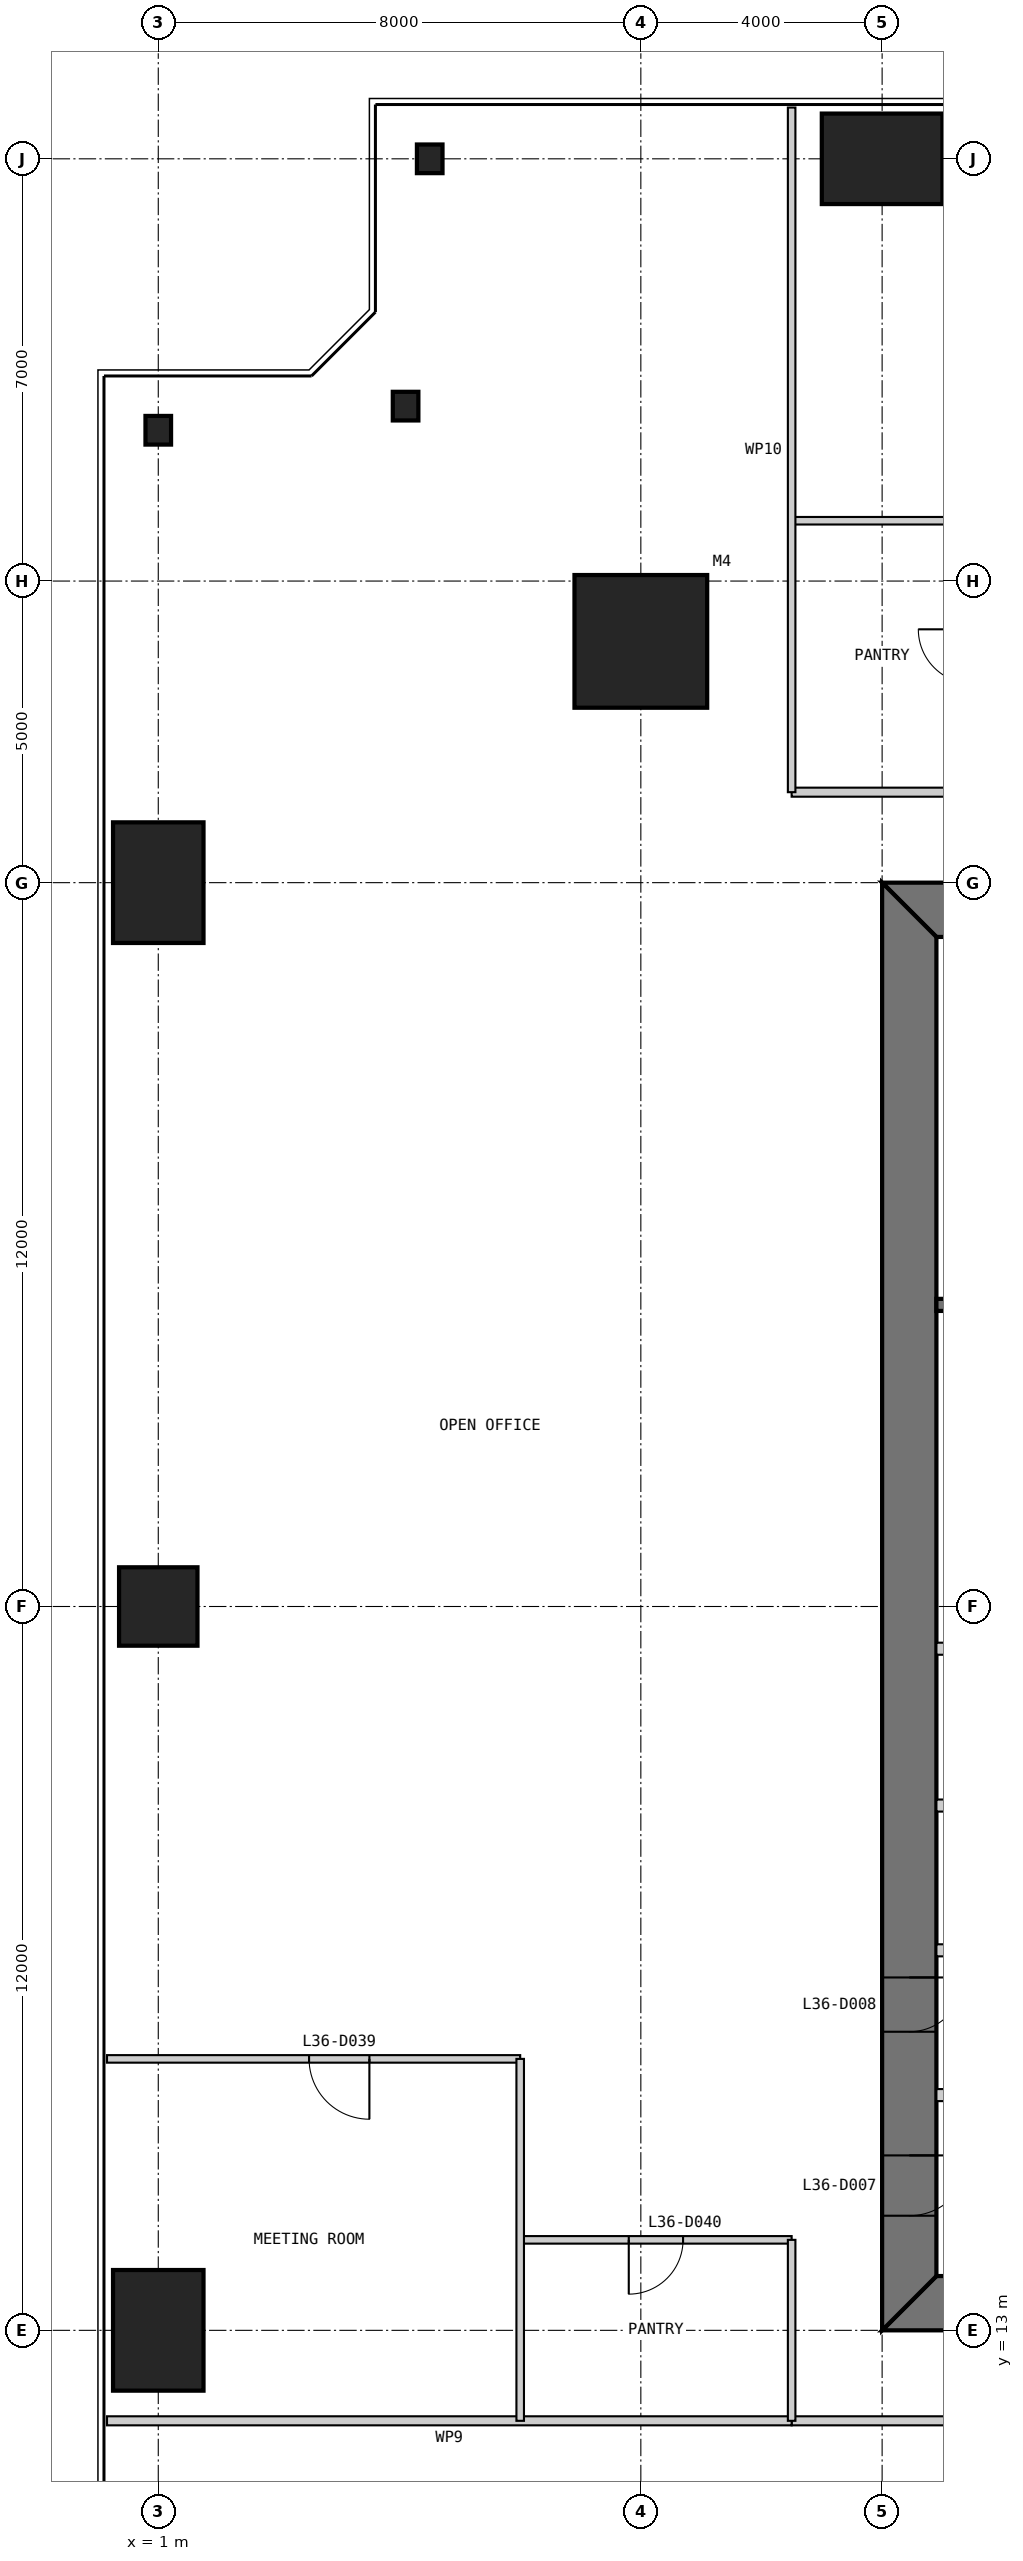
"""IFC4 building model, lengths in metres.
Left out: names, types, materials, properties, quantities, classifications, styles, units other than length and angle.
Written with IfcOpenShell. Run it as: python <this file> out.ifc"""

import sys

from ifc_helpers import new_model, si_unit, direction, frame, frame_2d, origin, origin_2d, place, context, subcontext, project, spatial, polyline, rectangle, i_section, outline, extrude, element, fill, save


model = new_model("IFC4")
c1 = context("Model", 3, precision=1e-05, world=origin(), true_north=direction((0.0, 1.0)))
c2 = subcontext(c1, "Body", "Model", "MODEL_VIEW")
j1 = project(units=[si_unit("LENGTHUNIT", "METRE"), si_unit("PLANEANGLEUNIT", "RADIAN")], contexts=[c1])
p1 = place(None, origin())
s1 = spatial("IfcSite", under=j1, at=p1, CompositionType="ELEMENT")
p2 = place(p1, origin())
s2 = spatial("IfcBuilding", under=s1, at=p2, CompositionType="ELEMENT")
p3 = place(p2, frame((0.0, 0.0, 154.4)))
s3 = spatial("IfcBuildingStorey", under=s2, at=p3, CompositionType="ELEMENT", Elevation=154.4)
p4 = place(p3, frame((9.0, 41.0, 0.0), z_axis=(0.0, 0.0, 1.0), x_axis=(1.0, 0.0, 0.0)))
e1 = element("IfcColumn", 1, at=p4, inside=s3, PredefinedType="COLUMN", context=c2, shape_type="SweptSolid", body=[
    extrude(rectangle(XDim=2.2, YDim=2.2, at=origin_2d()), origin(), (0.0, 0.0, 1.0), 4.0),
])
p5 = place(p3, frame((13.0, 49.0, 0.0), z_axis=(0.0, 0.0, 1.0), x_axis=(1.0, 0.0, 0.0)))
e2 = element("IfcColumn", 2, at=p5, inside=s3, PredefinedType="COLUMN", context=c2, shape_type="SweptSolid", body=[
    extrude(rectangle(XDim=2.0, YDim=1.5, at=origin_2d()), origin(), (0.0, 0.0, 1.0), 4.0),
])
for number, where, z_axis, x_axis in (
    (3, (5.5, 49.0, 0.0), (0.0, 0.0, 1.0), (1.0, 0.0, 0.0)),
    (4, (5.1, 44.9, 0.0), (0.0, 0.0, 1.0), (1.0, 0.0, 0.0)),
    (5, (1.0, 44.5, 0.0), (0.0, 0.0, 1.0), (1.0, 0.0, 0.0)),
):
    element("IfcColumn", number, at=place(p3, frame(where, z_axis=z_axis, x_axis=x_axis)), inside=s3, PredefinedType="COLUMN", context=c2, shape_type="SweptSolid", body=[
        extrude(i_section(OverallWidth=0.424, OverallDepth=0.475, WebThickness=0.048, FlangeThickness=0.077, at=origin_2d()), origin(), (0.0, 0.0, 1.0), 4.0),
    ])
p6 = place(p3, frame((1.0, 37.0, 0.0), z_axis=(0.0, 0.0, 1.0), x_axis=(1.0, 0.0, 0.0)))
e6 = element("IfcColumn", 6, at=p6, inside=s3, PredefinedType="COLUMN", context=c2, shape_type="SweptSolid", body=[
    extrude(rectangle(XDim=1.5, YDim=2.0, at=origin_2d()), origin(), (0.0, 0.0, 1.0), 4.0),
])
p7 = place(p3, frame((1.0, 25.0, 0.0), z_axis=(0.0, 0.0, 1.0), x_axis=(1.0, 0.0, 0.0)))
e7 = element("IfcColumn", 7, at=p7, inside=s3, PredefinedType="COLUMN", context=c2, shape_type="SweptSolid", body=[
    extrude(rectangle(XDim=1.3, YDim=1.3, at=origin_2d()), origin(), (0.0, 0.0, 1.0), 4.0),
])
p8 = place(p3, frame((1.0, 13.0, 0.0), z_axis=(0.0, 0.0, 1.0), x_axis=(1.0, 0.0, 0.0)))
e8 = element("IfcColumn", 8, at=p8, inside=s3, PredefinedType="COLUMN", context=c2, shape_type="SweptSolid", body=[
    extrude(rectangle(XDim=1.5, YDim=2.0, at=origin_2d()), origin(), (0.0, 0.0, 1.0), 4.0),
])
p9 = place(p3, frame((13.0, 13.45, 0.0), z_axis=(0.0, 0.0, 1.0), x_axis=(1.0, 0.0, 0.0)))
e9 = element("IfcWall", 9, at=p9, inside=s3, PredefinedType="SHEAR", context=c2, shape_type="SweptSolid", body=[
    extrude(outline(polyline([(0.0, -0.45), (24.0, -0.45), (23.1, 0.45), (0.9, 0.45), (0.0, -0.45)])), origin(), (0.0, 0.0, 1.0), 4.0),
])
p10 = place(p9, frame((4.9, 0.0, 0.0)))
e10 = element("IfcOpeningElement", 10, at=p10, cuts=e9, PredefinedType="OPENING", context=c2, shape_type="SweptSolid", body=[
    extrude(rectangle(XDim=1.0, YDim=2.2, at=frame_2d((0.5, 1.1))), frame((0.0, 0.46, 0.0), z_axis=(0.0, -1.0, 0.0), x_axis=(1.0, 0.0, 0.0)), (0.0, 0.0, 1.0), 0.92),
])
p11 = place(p9, frame((8.9, 0.0, 0.0)))
e11 = element("IfcOpeningElement", 11, at=p11, cuts=e9, PredefinedType="OPENING", context=c2, shape_type="SweptSolid", body=[
    extrude(rectangle(XDim=1.1, YDim=2.2, at=frame_2d((0.55, 1.1))), frame((0.0, 0.46, 0.0), z_axis=(0.0, -1.0, 0.0), x_axis=(1.0, 0.0, 0.0)), (0.0, 0.0, 1.0), 0.92),
])
p12 = place(p9, frame((15.05, 0.0, 0.0)))
e12 = element("IfcOpeningElement", 12, at=p12, cuts=e9, PredefinedType="OPENING", context=c2, shape_type="SweptSolid", body=[
    extrude(rectangle(XDim=0.9, YDim=2.2, at=frame_2d((0.45, 1.1))), frame((0.0, 0.46, 0.0), z_axis=(0.0, -1.0, 0.0), x_axis=(1.0, 0.0, 0.0)), (0.0, 0.0, 1.0), 0.92),
])
p13 = place(p9, frame((17.9, 0.0, 0.0)))
e13 = element("IfcOpeningElement", 13, at=p13, cuts=e9, PredefinedType="OPENING", context=c2, shape_type="SweptSolid", body=[
    extrude(rectangle(XDim=1.0, YDim=2.2, at=frame_2d((0.5, 1.1))), frame((0.0, 0.46, 0.0), z_axis=(0.0, -1.0, 0.0), x_axis=(1.0, 0.0, 0.0)), (0.0, 0.0, 1.0), 0.92),
])
p14 = place(p9, frame((21.4, 0.0, 0.0)))
e14 = element("IfcOpeningElement", 14, at=p14, cuts=e9, PredefinedType="OPENING", context=c2, shape_type="SweptSolid", body=[
    extrude(rectangle(XDim=1.0, YDim=2.2, at=frame_2d((0.5, 1.1))), frame((0.0, 0.46, 0.0), z_axis=(0.0, -1.0, 0.0), x_axis=(1.0, 0.0, 0.0)), (0.0, 0.0, 1.0), 0.92),
])
p15 = place(p3, frame((37.0, 36.55, 0.0), z_axis=(0.0, 0.0, 1.0), x_axis=(-1.0, 0.0, 0.0)))
e15 = element("IfcWall", 15, at=p15, inside=s3, PredefinedType="SHEAR", context=c2, shape_type="SweptSolid", body=[
    extrude(outline(polyline([(0.0, -0.45), (24.0, -0.45), (23.1, 0.45), (0.9, 0.45), (0.0, -0.45)])), origin(), (0.0, 0.0, 1.0), 4.0),
])
p16 = place(p15, frame((4.9, 0.0, 0.0)))
e16 = element("IfcOpeningElement", 16, at=p16, cuts=e15, PredefinedType="OPENING", context=c2, shape_type="SweptSolid", body=[
    extrude(rectangle(XDim=1.0, YDim=2.2, at=frame_2d((0.5, 1.1))), frame((0.0, 0.46, 0.0), z_axis=(0.0, -1.0, 0.0), x_axis=(1.0, 0.0, 0.0)), (0.0, 0.0, 1.0), 0.92),
])
p17 = place(p15, frame((8.9, 0.0, 0.0)))
e17 = element("IfcOpeningElement", 17, at=p17, cuts=e15, PredefinedType="OPENING", context=c2, shape_type="SweptSolid", body=[
    extrude(rectangle(XDim=1.1, YDim=2.2, at=frame_2d((0.55, 1.1))), frame((0.0, 0.46, 0.0), z_axis=(0.0, -1.0, 0.0), x_axis=(1.0, 0.0, 0.0)), (0.0, 0.0, 1.0), 0.92),
])
p18 = place(p15, frame((15.05, 0.0, 0.0)))
e18 = element("IfcOpeningElement", 18, at=p18, cuts=e15, PredefinedType="OPENING", context=c2, shape_type="SweptSolid", body=[
    extrude(rectangle(XDim=0.9, YDim=2.2, at=frame_2d((0.45, 1.1))), frame((0.0, 0.46, 0.0), z_axis=(0.0, -1.0, 0.0), x_axis=(1.0, 0.0, 0.0)), (0.0, 0.0, 1.0), 0.92),
])
p19 = place(p15, frame((17.9, 0.0, 0.0)))
e19 = element("IfcOpeningElement", 19, at=p19, cuts=e15, PredefinedType="OPENING", context=c2, shape_type="SweptSolid", body=[
    extrude(rectangle(XDim=1.0, YDim=2.2, at=frame_2d((0.5, 1.1))), frame((0.0, 0.46, 0.0), z_axis=(0.0, -1.0, 0.0), x_axis=(1.0, 0.0, 0.0)), (0.0, 0.0, 1.0), 0.92),
])
p20 = place(p15, frame((21.4, 0.0, 0.0)))
e20 = element("IfcOpeningElement", 20, at=p20, cuts=e15, PredefinedType="OPENING", context=c2, shape_type="SweptSolid", body=[
    extrude(rectangle(XDim=1.0, YDim=2.2, at=frame_2d((0.5, 1.1))), frame((0.0, 0.46, 0.0), z_axis=(0.0, -1.0, 0.0), x_axis=(1.0, 0.0, 0.0)), (0.0, 0.0, 1.0), 0.92),
])
p21 = place(p3, frame((13.45, 36.1, 0.0), z_axis=(0.0, 0.0, 1.0), x_axis=(0.0, -1.0, 0.0)))
e21 = element("IfcWall", 21, at=p21, inside=s3, PredefinedType="SHEAR", context=c2, shape_type="SweptSolid", body=[
    extrude(outline(polyline([(-0.9, -0.45), (23.1, -0.45), (22.2, 0.45), (0.0, 0.45), (-0.9, -0.45)])), origin(), (0.0, 0.0, 1.0), 4.0),
])
p22 = place(p21, frame((20.2, 0.0, 0.0)))
e22 = element("IfcOpeningElement", 22, at=p22, cuts=e21, PredefinedType="OPENING", context=c2, shape_type="SweptSolid", body=[
    extrude(rectangle(XDim=1.0, YDim=2.2, at=frame_2d((0.5, 1.1))), frame((0.0, 0.46, 0.0), z_axis=(0.0, -1.0, 0.0), x_axis=(1.0, 0.0, 0.0)), (0.0, 0.0, 1.0), 0.92),
])
p23 = place(p21, frame((17.25, 0.0, 0.0)))
e23 = element("IfcOpeningElement", 23, at=p23, cuts=e21, PredefinedType="OPENING", context=c2, shape_type="SweptSolid", body=[
    extrude(rectangle(XDim=0.9, YDim=2.2, at=frame_2d((0.45, 1.1))), frame((0.0, 0.46, 0.0), z_axis=(0.0, -1.0, 0.0), x_axis=(1.0, 0.0, 0.0)), (0.0, 0.0, 1.0), 0.92),
])
for number, where, z_axis, x_axis in (
    (24, (13.9, 16.9, 0.0), (0.0, 0.0, 1.0), (1.0, 0.0, 0.0)),
    (25, (13.9, 19.3, 0.0), (0.0, 0.0, 1.0), (1.0, 0.0, 0.0)),
    (26, (13.9, 21.7, 0.0), (0.0, 0.0, 1.0), (1.0, 0.0, 0.0)),
    (27, (13.9, 24.3, 0.0), (0.0, 0.0, 1.0), (1.0, 0.0, 0.0)),
):
    element("IfcWall", number, at=place(p3, frame(where, z_axis=z_axis, x_axis=x_axis)), inside=s3, PredefinedType="PARTITIONING", context=c2, shape_type="SweptSolid", body=[
        extrude(rectangle(XDim=2.8, YDim=0.2, at=frame_2d((1.4, 0.0))), origin(), (0.0, 0.0, 1.0), 3.8),
    ])
p24 = place(p3, frame((29.7, 30.0, 0.0), z_axis=(0.0, 0.0, 1.0), x_axis=(-1.0, 0.0, 0.0)))
e28 = element("IfcWall", 28, at=p24, inside=s3, PredefinedType="SOLIDWALL", context=c2, shape_type="SweptSolid", body=[
    extrude(rectangle(XDim=15.8, YDim=0.2, at=frame_2d((7.9, 0.0))), origin(), (0.0, 0.0, 1.0), 3.8),
])
p25 = place(p3, frame((11.5, 11.5, 0.0), z_axis=(0.0, 0.0, 1.0), x_axis=(1.0, 0.0, 0.0)))
e29 = element("IfcWall", 29, at=p25, inside=s3, PredefinedType="PARTITIONING", context=c2, shape_type="SweptSolid", body=[
    extrude(rectangle(XDim=27.0, YDim=0.15, at=frame_2d((13.5, 0.0))), origin(), (0.0, 0.0, 1.0), 3.85),
])
p26 = place(p25, frame((3.25, 0.0, 0.0)))
e30 = element("IfcOpeningElement", 30, at=p26, cuts=e29, PredefinedType="OPENING", context=c2, shape_type="SweptSolid", body=[
    extrude(rectangle(XDim=1.0, YDim=2.2, at=frame_2d((0.5, 1.1))), frame((0.0, 0.085, 0.0), z_axis=(0.0, -1.0, 0.0), x_axis=(1.0, 0.0, 0.0)), (0.0, 0.0, 1.0), 0.17),
])
p27 = place(p25, frame((16.0, 0.0, 0.0)))
e31 = element("IfcOpeningElement", 31, at=p27, cuts=e29, PredefinedType="OPENING", context=c2, shape_type="SweptSolid", body=[
    extrude(rectangle(XDim=1.0, YDim=2.2, at=frame_2d((0.5, 1.1))), frame((0.0, 0.085, 0.0), z_axis=(0.0, -1.0, 0.0), x_axis=(1.0, 0.0, 0.0)), (0.0, 0.0, 1.0), 0.17),
])
p28 = place(p3, frame((0.15, 11.5, 0.0), z_axis=(0.0, 0.0, 1.0), x_axis=(1.0, 0.0, 0.0)))
e32 = element("IfcWall", 32, at=p28, inside=s3, PredefinedType="PARTITIONING", context=c2, shape_type="SweptSolid", body=[
    extrude(rectangle(XDim=11.35, YDim=0.15, at=frame_2d((5.675, 0.0))), origin(), (0.0, 0.0, 1.0), 3.85),
])
p29 = place(p3, frame((38.5, 38.5, 0.0), z_axis=(0.0, 0.0, 1.0), x_axis=(-1.0, 0.0, 0.0)))
e33 = element("IfcWall", 33, at=p29, inside=s3, PredefinedType="PARTITIONING", context=c2, shape_type="SweptSolid", body=[
    extrude(rectangle(XDim=27.0, YDim=0.15, at=frame_2d((13.5, 0.0))), origin(), (0.0, 0.0, 1.0), 3.85),
])
p30 = place(p29, frame((13.0, 0.0, 0.0)))
e34 = element("IfcOpeningElement", 34, at=p30, cuts=e33, PredefinedType="OPENING", context=c2, shape_type="SweptSolid", body=[
    extrude(rectangle(XDim=1.0, YDim=2.2, at=frame_2d((0.5, 1.1))), frame((0.0, 0.085, 0.0), z_axis=(0.0, -1.0, 0.0), x_axis=(1.0, 0.0, 0.0)), (0.0, 0.0, 1.0), 0.17),
])
p31 = place(p3, frame((35.5, 43.0, 0.0), z_axis=(0.0, 0.0, 1.0), x_axis=(-1.0, 0.0, 0.0)))
e35 = element("IfcWall", 35, at=p31, inside=s3, PredefinedType="PARTITIONING", context=c2, shape_type="SweptSolid", body=[
    extrude(rectangle(XDim=24.0, YDim=0.125, at=frame_2d((12.0, 0.0))), origin(), (0.0, 0.0, 1.0), 3.85),
])
p32 = place(p31, frame((4.05, 0.0, 0.0)))
e36 = element("IfcOpeningElement", 36, at=p32, cuts=e35, PredefinedType="OPENING", context=c2, shape_type="SweptSolid", body=[
    extrude(rectangle(XDim=0.9, YDim=2.2, at=frame_2d((0.45, 1.1))), frame((0.0, 0.073, 0.0), z_axis=(0.0, -1.0, 0.0), x_axis=(1.0, 0.0, 0.0)), (0.0, 0.0, 1.0), 0.145),
])
p33 = place(p31, frame((10.05, 0.0, 0.0)))
e37 = element("IfcOpeningElement", 37, at=p33, cuts=e35, PredefinedType="OPENING", context=c2, shape_type="SweptSolid", body=[
    extrude(rectangle(XDim=0.9, YDim=2.2, at=frame_2d((0.45, 1.1))), frame((0.0, 0.073, 0.0), z_axis=(0.0, -1.0, 0.0), x_axis=(1.0, 0.0, 0.0)), (0.0, 0.0, 1.0), 0.145),
])
p34 = place(p31, frame((16.05, 0.0, 0.0)))
e38 = element("IfcOpeningElement", 38, at=p34, cuts=e35, PredefinedType="OPENING", context=c2, shape_type="SweptSolid", body=[
    extrude(rectangle(XDim=0.9, YDim=2.2, at=frame_2d((0.45, 1.1))), frame((0.0, 0.073, 0.0), z_axis=(0.0, -1.0, 0.0), x_axis=(1.0, 0.0, 0.0)), (0.0, 0.0, 1.0), 0.145),
])
p35 = place(p31, frame((19.05, 0.0, 0.0)))
e39 = element("IfcOpeningElement", 39, at=p35, cuts=e35, PredefinedType="OPENING", context=c2, shape_type="SweptSolid", body=[
    extrude(rectangle(XDim=0.9, YDim=2.2, at=frame_2d((0.45, 1.1))), frame((0.0, 0.073, 0.0), z_axis=(0.0, -1.0, 0.0), x_axis=(1.0, 0.0, 0.0)), (0.0, 0.0, 1.0), 0.145),
])
p36 = place(p3, frame((11.5, 49.85, 0.0), z_axis=(0.0, 0.0, 1.0), x_axis=(0.0, -1.0, 0.0)))
e40 = element("IfcWall", 40, at=p36, inside=s3, PredefinedType="PARTITIONING", context=c2, shape_type="SweptSolid", body=[
    extrude(rectangle(XDim=11.35, YDim=0.125, at=frame_2d((5.675, 0.0))), origin(), (0.0, 0.0, 1.0), 3.85),
])
p37 = place(p3, frame((0.15, 17.5, 0.0), z_axis=(0.0, 0.0, 1.0), x_axis=(1.0, 0.0, 0.0)))
e41 = element("IfcWall", 41, at=p37, inside=s3, PredefinedType="PARTITIONING", context=c2, shape_type="SweptSolid", body=[
    extrude(rectangle(XDim=6.85, YDim=0.125, at=frame_2d((3.425, 0.0))), origin(), (0.0, 0.0, 1.0), 3.85),
])
p38 = place(p37, frame((3.35, 0.0, 0.0)))
e42 = element("IfcOpeningElement", 42, at=p38, cuts=e41, PredefinedType="OPENING", context=c2, shape_type="SweptSolid", body=[
    extrude(rectangle(XDim=1.0, YDim=2.2, at=frame_2d((0.5, 1.1))), frame((0.0, 0.073, 0.0), z_axis=(0.0, -1.0, 0.0), x_axis=(1.0, 0.0, 0.0)), (0.0, 0.0, 1.0), 0.145),
])
p39 = place(p3, frame((7.0, 14.5, 0.0), z_axis=(0.0, 0.0, 1.0), x_axis=(1.0, 0.0, 0.0)))
e43 = element("IfcWall", 43, at=p39, inside=s3, PredefinedType="PARTITIONING", context=c2, shape_type="SweptSolid", body=[
    extrude(rectangle(XDim=4.5, YDim=0.125, at=frame_2d((2.25, 0.0))), origin(), (0.0, 0.0, 1.0), 3.85),
])
p40 = place(p39, frame((1.8, 0.0, 0.0)))
e44 = element("IfcOpeningElement", 44, at=p40, cuts=e43, PredefinedType="OPENING", context=c2, shape_type="SweptSolid", body=[
    extrude(rectangle(XDim=0.9, YDim=2.2, at=frame_2d((0.45, 1.1))), frame((0.0, 0.073, 0.0), z_axis=(0.0, -1.0, 0.0), x_axis=(1.0, 0.0, 0.0)), (0.0, 0.0, 1.0), 0.145),
])
p41 = place(p3, frame((7.0, 17.5, 0.0), z_axis=(0.0, 0.0, 1.0), x_axis=(0.0, -1.0, 0.0)))
e45 = element("IfcWall", 45, at=p41, inside=s3, PredefinedType="PARTITIONING", context=c2, shape_type="SweptSolid", body=[
    extrude(rectangle(XDim=6.0, YDim=0.125, at=frame_2d((3.0, 0.0))), origin(), (0.0, 0.0, 1.0), 3.238),
])
p42 = place(p3, frame((11.5, 14.5, 0.0), z_axis=(0.0, 0.0, 1.0), x_axis=(0.0, -1.0, 0.0)))
e46 = element("IfcWall", 46, at=p42, inside=s3, PredefinedType="PARTITIONING", context=c2, shape_type="SweptSolid", body=[
    extrude(rectangle(XDim=3.0, YDim=0.125, at=frame_2d((1.5, 0.0))), origin(), (0.0, 0.0, 1.0), 3.85),
])
p43 = place(p22, origin())
e47 = element("IfcDoor", 47, at=p43, inside=s3, OperationType="SINGLE_SWING_LEFT", PredefinedType="DOOR", context=c2, shape_type="SweptSolid", body=[
    extrude(rectangle(XDim=1.0, YDim=2.2, at=frame_2d((0.5, 1.1))), frame((0.0, 0.025, 0.0), z_axis=(0.0, -1.0, 0.0), x_axis=(1.0, 0.0, 0.0)), (0.0, 0.0, 1.0), 0.05),
    extrude(outline(polyline([(0.0, 0.0), (0.04, 0.0), (0.04, 2.16), (0.96, 2.16), (0.96, 0.0), (1.0, 0.0), (1.0, 2.2), (0.0, 2.2), (0.0, 0.0)])), frame((0.0, 0.3, 0.0), z_axis=(0.0, -1.0, 0.0), x_axis=(1.0, 0.0, 0.0)), (0.0, 0.0, 1.0), 0.6),
])
fill(e22, e47)
p44 = place(p23, origin())
e48 = element("IfcDoor", 48, at=p44, inside=s3, OperationType="SINGLE_SWING_LEFT", PredefinedType="DOOR", context=c2, shape_type="SweptSolid", body=[
    extrude(rectangle(XDim=0.9, YDim=2.2, at=frame_2d((0.45, 1.1))), frame((0.0, 0.025, 0.0), z_axis=(0.0, -1.0, 0.0), x_axis=(1.0, 0.0, 0.0)), (0.0, 0.0, 1.0), 0.05),
    extrude(outline(polyline([(0.0, 0.0), (0.04, 0.0), (0.04, 2.16), (0.86, 2.16), (0.86, 0.0), (0.9, 0.0), (0.9, 2.2), (0.0, 2.2), (0.0, 0.0)])), frame((0.0, 0.3, 0.0), z_axis=(0.0, -1.0, 0.0), x_axis=(1.0, 0.0, 0.0)), (0.0, 0.0, 1.0), 0.6),
])
fill(e23, e48)
p45 = place(p38, frame((1.0, 0.0, 0.0), z_axis=(0.0, 0.0, 1.0), x_axis=(-1.0, 0.0, 0.0)))
e49 = element("IfcDoor", 49, at=p45, inside=s3, OperationType="SINGLE_SWING_LEFT", PredefinedType="DOOR", context=c2, shape_type="SweptSolid", body=[
    extrude(rectangle(XDim=1.0, YDim=2.2, at=frame_2d((0.5, 1.1))), frame((0.0, 0.025, 0.0), z_axis=(0.0, -1.0, 0.0), x_axis=(1.0, 0.0, 0.0)), (0.0, 0.0, 1.0), 0.05),
])
fill(e42, e49)
p46 = place(p40, frame((0.9, 0.0, 0.0), z_axis=(0.0, 0.0, 1.0), x_axis=(-1.0, 0.0, 0.0)))
e50 = element("IfcDoor", 50, at=p46, inside=s3, OperationType="SINGLE_SWING_RIGHT", PredefinedType="DOOR", context=c2, shape_type="SweptSolid", body=[
    extrude(rectangle(XDim=0.9, YDim=2.2, at=frame_2d((0.45, 1.1))), frame((0.0, 0.025, 0.0), z_axis=(0.0, -1.0, 0.0), x_axis=(1.0, 0.0, 0.0)), (0.0, 0.0, 1.0), 0.05),
])
fill(e44, e50)
save(model, sys.argv[1])
